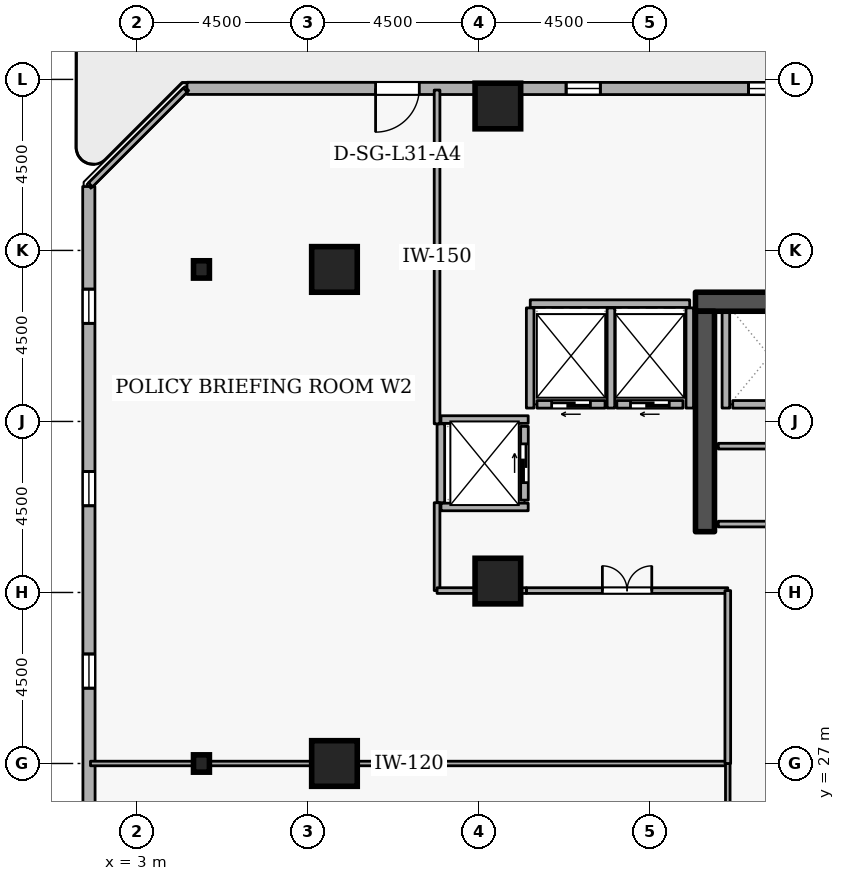
"""IFC4 building model, lengths in metres.
Left out: names, types, materials, properties, quantities, classifications, styles, units other than length and angle.
Written with IfcOpenShell. Run it as: python <this file> out.ifc"""

import sys

from ifc_helpers import new_model, si_unit, direction, frame, frame_2d, origin, origin_2d, place, context, subcontext, project, spatial, rectangle, i_section, extrude, element, fill, save


model = new_model("IFC4")
c1 = context("Model", 3, precision=1e-05, world=origin(), true_north=direction((0.0, 1.0)))
c2 = subcontext(c1, "Body", "Model", "MODEL_VIEW")
j1 = project(units=[si_unit("LENGTHUNIT", "METRE"), si_unit("PLANEANGLEUNIT", "RADIAN")], contexts=[c1])
p1 = place(None, origin())
s1 = spatial("IfcSite", under=j1, at=p1, CompositionType="ELEMENT")
p2 = place(p1, origin())
s2 = spatial("IfcBuilding", under=s1, at=p2, CompositionType="ELEMENT")
p3 = place(p2, frame((0.0, 0.0, 119.7)))
s3 = spatial("IfcBuildingStorey", under=s2, at=p3, CompositionType="ELEMENT", Elevation=119.7)
p4 = place(p3, frame((17.7, 39.15, 0.0), z_axis=(0.0, 0.0, 1.0), x_axis=(1.0, 0.0, 0.0)))
e1 = element("IfcWall", 1, at=p4, inside=s3, PredefinedType="SHEAR", context=c2, shape_type="SweptSolid", body=[
    extrude(rectangle(XDim=15.6, YDim=0.5, at=frame_2d((7.8, 0.0))), origin(), (0.0, 0.0, 1.0), 3.6),
])
p5 = place(p3, frame((17.95, 33.1, 0.0), z_axis=(0.0, 0.0, 1.0), x_axis=(0.0, 1.0, 0.0)))
e2 = element("IfcWall", 2, at=p5, inside=s3, PredefinedType="SHEAR", context=c2, shape_type="SweptSolid", body=[
    extrude(rectangle(XDim=5.8, YDim=0.5, at=frame_2d((2.9, 0.0))), origin(), (0.0, 0.0, 1.0), 3.6),
])
for number, where, z_axis, x_axis in (
    (3, (12.5, 44.3, 0.0), (0.0, 0.0, 1.0), (1.0, 0.0, 0.0)),
    (4, (8.2, 27.0, 0.0), (0.0, 0.0, 1.0), (1.0, 0.0, 0.0)),
    (5, (8.2, 40.0, 0.0), (0.0, 0.0, 1.0), (1.0, 0.0, 0.0)),
    (6, (12.5, 31.8, 0.0), (0.0, 0.0, 1.0), (1.0, 0.0, 0.0)),
):
    element("IfcColumn", number, at=place(p3, frame(where, z_axis=z_axis, x_axis=x_axis)), inside=s3, PredefinedType="COLUMN", context=c2, shape_type="SweptSolid", body=[
        extrude(rectangle(XDim=1.2, YDim=1.2, at=origin_2d()), origin(), (0.0, 0.0, 1.0), 3.6),
    ])
for number, where, z_axis, x_axis in (
    (7, (4.7, 27.0, 0.0), (0.0, 0.0, 1.0), (1.0, 0.0, 0.0)),
    (8, (4.7, 40.0, 0.0), (0.0, 0.0, 1.0), (1.0, 0.0, 0.0)),
):
    element("IfcColumn", number, at=place(p3, frame(where, z_axis=z_axis, x_axis=x_axis)), inside=s3, PredefinedType="COLUMN", context=c2, shape_type="SweptSolid", body=[
        extrude(i_section(OverallWidth=0.418, OverallDepth=0.456, WebThickness=0.042, FlangeThickness=0.067, FilletRadius=0.015, at=origin_2d()), origin(), (0.0, 0.0, 1.0), 3.6),
    ])
p6 = place(p3, frame((37.096, 44.753, 0.0), z_axis=(0.0, 0.0, 1.0), x_axis=(-0.999999933399, 0.000364968916, 0.0)))
e9 = element("IfcWall", 9, at=p6, inside=s3, PredefinedType="STANDARD", context=c2, shape_type="SweptSolid", body=[
    extrude(rectangle(XDim=32.778, YDim=0.32, at=frame_2d((16.389, 0.0))), origin(), (0.0, 0.0, 1.0), 2.7),
])
p7 = place(p6, frame((26.664, 0.0, 0.0)))
e10 = element("IfcOpeningElement", 10, at=p7, cuts=e9, PredefinedType="OPENING", context=c2, shape_type="SweptSolid", body=[
    extrude(rectangle(XDim=1.15, YDim=2.1, at=frame_2d((0.575, 1.05))), frame((0.0, 0.17, 0.0), z_axis=(0.0, -1.0, 0.0), x_axis=(1.0, 0.0, 0.0)), (0.0, 0.0, 1.0), 0.34),
])
p8 = place(p6, frame((2.7, 0.0, 0.72)))
e11 = element("IfcOpeningElement", 11, at=p8, cuts=e9, PredefinedType="OPENING", context=c2, shape_type="SweptSolid", body=[
    extrude(rectangle(XDim=0.9, YDim=1.75, at=frame_2d((0.45, 0.875))), frame((0.0, 0.17, 0.0), z_axis=(0.0, -1.0, 0.0), x_axis=(1.0, 0.0, 0.0)), (0.0, 0.0, 1.0), 0.34),
])
p9 = place(p6, frame((7.5, 0.0, 0.72)))
e12 = element("IfcOpeningElement", 12, at=p9, cuts=e9, PredefinedType="OPENING", context=c2, shape_type="SweptSolid", body=[
    extrude(rectangle(XDim=0.9, YDim=1.75, at=frame_2d((0.45, 0.875))), frame((0.0, 0.17, 0.0), z_axis=(0.0, -1.0, 0.0), x_axis=(1.0, 0.0, 0.0)), (0.0, 0.0, 1.0), 0.34),
])
p10 = place(p6, frame((17.1, 0.0, 0.72)))
e13 = element("IfcOpeningElement", 13, at=p10, cuts=e9, PredefinedType="OPENING", context=c2, shape_type="SweptSolid", body=[
    extrude(rectangle(XDim=0.9, YDim=1.75, at=frame_2d((0.45, 0.875))), frame((0.0, 0.17, 0.0), z_axis=(0.0, -1.0, 0.0), x_axis=(1.0, 0.0, 0.0)), (0.0, 0.0, 1.0), 0.34),
])
p11 = place(p6, frame((21.9, 0.0, 0.72)))
e14 = element("IfcOpeningElement", 14, at=p11, cuts=e9, PredefinedType="OPENING", context=c2, shape_type="SweptSolid", body=[
    extrude(rectangle(XDim=0.9, YDim=1.75, at=frame_2d((0.45, 0.875))), frame((0.0, 0.17, 0.0), z_axis=(0.0, -1.0, 0.0), x_axis=(1.0, 0.0, 0.0)), (0.0, 0.0, 1.0), 0.34),
])
p12 = place(p3, frame((1.735, 42.181, 0.0), z_axis=(0.0, 0.0, 1.0), x_axis=(0.000364968916, -0.999999933399, 0.0)))
e15 = element("IfcWall", 15, at=p12, inside=s3, PredefinedType="STANDARD", context=c2, shape_type="SweptSolid", body=[
    extrude(rectangle(XDim=32.778, YDim=0.32, at=frame_2d((16.389, 0.0))), origin(), (0.0, 0.0, 1.0), 2.7),
])
p13 = place(p12, frame((2.7, 0.0, 0.72)))
e16 = element("IfcOpeningElement", 16, at=p13, cuts=e15, PredefinedType="OPENING", context=c2, shape_type="SweptSolid", body=[
    extrude(rectangle(XDim=0.9, YDim=1.75, at=frame_2d((0.45, 0.875))), frame((0.0, 0.17, 0.0), z_axis=(0.0, -1.0, 0.0), x_axis=(1.0, 0.0, 0.0)), (0.0, 0.0, 1.0), 0.34),
])
p14 = place(p12, frame((7.5, 0.0, 0.72)))
e17 = element("IfcOpeningElement", 17, at=p14, cuts=e15, PredefinedType="OPENING", context=c2, shape_type="SweptSolid", body=[
    extrude(rectangle(XDim=0.9, YDim=1.75, at=frame_2d((0.45, 0.875))), frame((0.0, 0.17, 0.0), z_axis=(0.0, -1.0, 0.0), x_axis=(1.0, 0.0, 0.0)), (0.0, 0.0, 1.0), 0.34),
])
p15 = place(p12, frame((12.3, 0.0, 0.72)))
e18 = element("IfcOpeningElement", 18, at=p15, cuts=e15, PredefinedType="OPENING", context=c2, shape_type="SweptSolid", body=[
    extrude(rectangle(XDim=0.9, YDim=1.75, at=frame_2d((0.45, 0.875))), frame((0.0, 0.17, 0.0), z_axis=(0.0, -1.0, 0.0), x_axis=(1.0, 0.0, 0.0)), (0.0, 0.0, 1.0), 0.34),
])
p16 = place(p12, frame((17.1, 0.0, 0.72)))
e19 = element("IfcOpeningElement", 19, at=p16, cuts=e15, PredefinedType="OPENING", context=c2, shape_type="SweptSolid", body=[
    extrude(rectangle(XDim=0.9, YDim=1.75, at=frame_2d((0.45, 0.875))), frame((0.0, 0.17, 0.0), z_axis=(0.0, -1.0, 0.0), x_axis=(1.0, 0.0, 0.0)), (0.0, 0.0, 1.0), 0.34),
])
p17 = place(p12, frame((21.9, 0.0, 0.72)))
e20 = element("IfcOpeningElement", 20, at=p17, cuts=e15, PredefinedType="OPENING", context=c2, shape_type="SweptSolid", body=[
    extrude(rectangle(XDim=0.9, YDim=1.75, at=frame_2d((0.45, 0.875))), frame((0.0, 0.17, 0.0), z_axis=(0.0, -1.0, 0.0), x_axis=(1.0, 0.0, 0.0)), (0.0, 0.0, 1.0), 0.34),
])
p18 = place(p12, frame((26.7, 0.0, 0.72)))
e21 = element("IfcOpeningElement", 21, at=p18, cuts=e15, PredefinedType="OPENING", context=c2, shape_type="SweptSolid", body=[
    extrude(rectangle(XDim=0.9, YDim=1.75, at=frame_2d((0.45, 0.875))), frame((0.0, 0.17, 0.0), z_axis=(0.0, -1.0, 0.0), x_axis=(1.0, 0.0, 0.0)), (0.0, 0.0, 1.0), 0.34),
])
p19 = place(p3, frame((20.62, 36.45, 0.0), z_axis=(0.0, 0.0, 1.0), x_axis=(-1.0, 0.0, 0.0)))
e22 = element("IfcWall", 22, at=p19, inside=s3, PredefinedType="STANDARD", context=c2, shape_type="SweptSolid", body=[
    extrude(rectangle(XDim=1.94, YDim=0.2, at=frame_2d((0.97, 0.0))), origin(), (0.0, 0.0, 1.0), 3.32),
])
p20 = place(p3, frame((17.37, 36.45, 0.0), z_axis=(0.0, 0.0, 1.0), x_axis=(-1.0, 0.0, 0.0)))
e23 = element("IfcWall", 23, at=p20, inside=s3, PredefinedType="STANDARD", context=c2, shape_type="SweptSolid", body=[
    extrude(rectangle(XDim=1.74, YDim=0.2, at=frame_2d((0.87, 0.0))), origin(), (0.0, 0.0, 1.0), 3.32),
])
p21 = place(p20, frame((0.36, 0.0, 0.0)))
e24 = element("IfcOpeningElement", 24, at=p21, cuts=e23, PredefinedType="OPENING", context=c2, shape_type="SweptSolid", body=[
    extrude(rectangle(XDim=1.02, YDim=2.06, at=frame_2d((0.51, 1.03))), frame((0.0, 0.11, 0.0), z_axis=(0.0, -1.0, 0.0), x_axis=(1.0, 0.0, 0.0)), (0.0, 0.0, 1.0), 0.22),
])
p22 = place(p3, frame((15.32, 36.45, 0.0), z_axis=(0.0, 0.0, 1.0), x_axis=(-1.0, 0.0, 0.0)))
e25 = element("IfcWall", 25, at=p22, inside=s3, PredefinedType="STANDARD", context=c2, shape_type="SweptSolid", body=[
    extrude(rectangle(XDim=1.79, YDim=0.2, at=frame_2d((0.895, 0.0))), origin(), (0.0, 0.0, 1.0), 3.32),
])
p23 = place(p22, frame((0.385, 0.0, 0.0)))
e26 = element("IfcOpeningElement", 26, at=p23, cuts=e25, PredefinedType="OPENING", context=c2, shape_type="SweptSolid", body=[
    extrude(rectangle(XDim=1.02, YDim=2.06, at=frame_2d((0.51, 1.03))), frame((0.0, 0.11, 0.0), z_axis=(0.0, -1.0, 0.0), x_axis=(1.0, 0.0, 0.0)), (0.0, 0.0, 1.0), 0.22),
])
p24 = place(p3, frame((13.2, 33.93, 0.0), z_axis=(0.0, 0.0, 1.0), x_axis=(0.0, 1.0, 0.0)))
e27 = element("IfcWall", 27, at=p24, inside=s3, PredefinedType="STANDARD", context=c2, shape_type="SweptSolid", body=[
    extrude(rectangle(XDim=1.94, YDim=0.2, at=frame_2d((0.97, 0.0))), origin(), (0.0, 0.0, 1.0), 3.32),
])
p25 = place(p24, frame((0.46, 0.0, 0.0)))
e28 = element("IfcOpeningElement", 28, at=p25, cuts=e27, PredefinedType="OPENING", context=c2, shape_type="SweptSolid", body=[
    extrude(rectangle(XDim=1.02, YDim=2.06, at=frame_2d((0.51, 1.03))), frame((0.0, 0.11, 0.0), z_axis=(0.0, -1.0, 0.0), x_axis=(1.0, 0.0, 0.0)), (0.0, 0.0, 1.0), 0.22),
])
p26 = place(p3, frame((18.5, 36.352, 0.0), z_axis=(0.0, 0.0, 1.0), x_axis=(0.0, 1.0, 0.0)))
e29 = element("IfcWall", 29, at=p26, inside=s3, PredefinedType="STANDARD", context=c2, shape_type="SweptSolid", body=[
    extrude(rectangle(XDim=2.536, YDim=0.2, at=frame_2d((1.268, 0.0))), origin(), (0.0, 0.0, 1.0), 3.32),
])
p27 = place(p3, frame((13.352, 39.1, 0.0), z_axis=(0.0, 0.0, 1.0), x_axis=(1.0, 0.0, 0.0)))
e30 = element("IfcWall", 30, at=p27, inside=s3, PredefinedType="STANDARD", context=c2, shape_type="SweptSolid", body=[
    extrude(rectangle(XDim=4.196, YDim=0.2, at=frame_2d((2.098, 0.0))), origin(), (0.0, 0.0, 1.0), 3.32),
])
p28 = place(p3, frame((17.55, 36.352, 0.0), z_axis=(0.0, 0.0, 1.0), x_axis=(0.0, 1.0, 0.0)))
e31 = element("IfcWall", 31, at=p28, inside=s3, PredefinedType="STANDARD", context=c2, shape_type="SweptSolid", body=[
    extrude(rectangle(XDim=2.636, YDim=0.2, at=frame_2d((1.318, 0.0))), origin(), (0.0, 0.0, 1.0), 2.525),
])
for number, where, z_axis, x_axis in (
    (32, (15.475, 36.352, 0.0), (0.0, 0.0, 1.0), (0.0, 1.0, 0.0)),
    (33, (13.35, 36.352, 0.0), (0.0, 0.0, 1.0), (0.0, 1.0, 0.0)),
):
    element("IfcWall", number, at=place(p3, frame(where, z_axis=z_axis, x_axis=x_axis)), inside=s3, PredefinedType="STANDARD", context=c2, shape_type="SweptSolid", body=[
        extrude(rectangle(XDim=2.636, YDim=0.2, at=frame_2d((1.318, 0.0))), origin(), (0.0, 0.0, 1.0), 3.32),
    ])
for number, where, z_axis, x_axis in (
    (34, (11.002, 36.05, 0.0), (0.0, 0.0, 1.0), (1.0, 0.0, 0.0)),
    (35, (11.002, 33.75, 0.0), (0.0, 0.0, 1.0), (1.0, 0.0, 0.0)),
):
    element("IfcWall", number, at=place(p3, frame(where, z_axis=z_axis, x_axis=x_axis)), inside=s3, PredefinedType="STANDARD", context=c2, shape_type="SweptSolid", body=[
        extrude(rectangle(XDim=2.296, YDim=0.2, at=frame_2d((1.148, 0.0))), origin(), (0.0, 0.0, 1.0), 3.32),
    ])
p29 = place(p3, frame((11.0, 33.862, 0.0), z_axis=(0.0, 0.0, 1.0), x_axis=(0.0, 1.0, 0.0)))
e36 = element("IfcWall", 36, at=p29, inside=s3, PredefinedType="STANDARD", context=c2, shape_type="SweptSolid", body=[
    extrude(rectangle(XDim=2.076, YDim=0.2, at=frame_2d((1.038, 0.0))), origin(), (0.0, 0.0, 1.0), 3.32),
])
p30 = place(p3, frame((18.3, 35.35, 0.0), z_axis=(0.0, 0.0, 1.0), x_axis=(1.0, 0.0, 0.0)))
e37 = element("IfcWall", 37, at=p30, inside=s3, PredefinedType="PARTITIONING", context=c2, shape_type="SweptSolid", body=[
    extrude(rectangle(XDim=4.25, YDim=0.15, at=frame_2d((2.125, 0.0))), origin(), (0.0, 0.0, 1.0), 3.32),
])
p31 = place(p3, frame((22.55, 33.3, 0.0), z_axis=(0.0, 0.0, 1.0), x_axis=(-1.0, 0.0, 0.0)))
e38 = element("IfcWall", 38, at=p31, inside=s3, PredefinedType="PARTITIONING", context=c2, shape_type="SweptSolid", body=[
    extrude(rectangle(XDim=4.25, YDim=0.15, at=frame_2d((2.125, 0.0))), origin(), (0.0, 0.0, 1.0), 3.32),
])
p32 = place(p31, frame((1.665, 0.0, 0.0)))
e39 = element("IfcOpeningElement", 39, at=p32, cuts=e38, PredefinedType="OPENING", context=c2, shape_type="SweptSolid", body=[
    extrude(rectangle(XDim=0.92, YDim=2.08, at=frame_2d((0.46, 1.04))), frame((0.0, 0.085, 0.0), z_axis=(0.0, -1.0, 0.0), x_axis=(1.0, 0.0, 0.0)), (0.0, 0.0, 1.0), 0.17),
])
p33 = place(p3, frame((1.78, 27.0, 0.0), z_axis=(0.0, 0.0, 1.0), x_axis=(1.0, 0.0, 0.0)))
e40 = element("IfcWall", 40, at=p33, inside=s3, PredefinedType="PARTITIONING", context=c2, shape_type="SweptSolid", body=[
    extrude(rectangle(XDim=16.77, YDim=0.12, at=frame_2d((8.385, 0.0))), origin(), (0.0, 0.0, 1.0), 2.912),
])
p34 = place(p3, frame((18.55, 27.0, 0.0), z_axis=(0.0, 0.0, 1.0), x_axis=(0.0, -1.0, 0.0)))
e41 = element("IfcWall", 41, at=p34, inside=s3, PredefinedType="PARTITIONING", context=c2, shape_type="SweptSolid", body=[
    extrude(rectangle(XDim=4.55, YDim=0.12, at=frame_2d((2.275, 0.0))), origin(), (0.0, 0.0, 1.0), 3.32),
])
p35 = place(p3, frame((13.25, 31.55, 0.0), z_axis=(0.0, 0.0, 1.0), x_axis=(1.0, 0.0, 0.0)))
e42 = element("IfcWall", 42, at=p35, inside=s3, PredefinedType="PARTITIONING", context=c2, shape_type="SweptSolid", body=[
    extrude(rectangle(XDim=5.3, YDim=0.15, at=frame_2d((2.65, 0.0))), origin(), (0.0, 0.0, 1.0), 3.32),
])
p36 = place(p35, frame((2.0, 0.0, 0.0)))
e43 = element("IfcOpeningElement", 43, at=p36, cuts=e42, PredefinedType="OPENING", context=c2, shape_type="SweptSolid", body=[
    extrude(rectangle(XDim=1.3, YDim=2.12, at=frame_2d((0.65, 1.06))), frame((0.0, 0.085, 0.0), z_axis=(0.0, -1.0, 0.0), x_axis=(1.0, 0.0, 0.0)), (0.0, 0.0, 1.0), 0.17),
])
p37 = place(p3, frame((18.55, 31.55, 0.0), z_axis=(0.0, 0.0, 1.0), x_axis=(0.0, -1.0, 0.0)))
e44 = element("IfcWall", 44, at=p37, inside=s3, PredefinedType="PARTITIONING", context=c2, shape_type="SweptSolid", body=[
    extrude(rectangle(XDim=4.55, YDim=0.15, at=frame_2d((2.275, 0.0))), origin(), (0.0, 0.0, 1.0), 3.32),
])
p38 = place(p3, frame((1.78, 42.225, 0.0), z_axis=(0.0, 0.0, 1.0), x_axis=(0.707106781187, 0.707106781187, 0.0)))
e45 = element("IfcWall", 45, at=p38, inside=s3, PredefinedType="PARTITIONING", context=c2, shape_type="SweptSolid", body=[
    extrude(rectangle(XDim=3.528, YDim=0.15, at=frame_2d((1.764, 0.0))), origin(), (0.0, 0.0, 1.0), 3.32),
])
p39 = place(p3, frame((10.9, 44.72, 0.0), z_axis=(0.0, 0.0, 1.0), x_axis=(0.0, -1.0, 0.0)))
e46 = element("IfcWall", 46, at=p39, inside=s3, PredefinedType="PARTITIONING", context=c2, shape_type="SweptSolid", body=[
    extrude(rectangle(XDim=8.782, YDim=0.15, at=frame_2d((4.391, 0.0))), origin(), (0.0, 0.0, 1.0), 3.32),
])
p40 = place(p3, frame((10.9, 33.862, 0.0), z_axis=(0.0, 0.0, 1.0), x_axis=(0.0, -1.0, 0.0)))
e47 = element("IfcWall", 47, at=p40, inside=s3, PredefinedType="PARTITIONING", context=c2, shape_type="SweptSolid", body=[
    extrude(rectangle(XDim=2.312, YDim=0.15, at=frame_2d((1.156, 0.0))), origin(), (0.0, 0.0, 1.0), 3.32),
])
p41 = place(p3, frame((10.9, 31.55, 0.0), z_axis=(0.0, 0.0, 1.0), x_axis=(1.0, 0.0, 0.0)))
e48 = element("IfcWall", 48, at=p41, inside=s3, PredefinedType="PARTITIONING", context=c2, shape_type="SweptSolid", body=[
    extrude(rectangle(XDim=2.35, YDim=0.15, at=frame_2d((1.175, 0.0))), origin(), (0.0, 0.0, 1.0), 3.32),
])
p42 = place(p7, origin())
e49 = element("IfcDoor", 49, at=p42, inside=s3, OperationType="SINGLE_SWING_RIGHT", PredefinedType="DOOR", context=c2, shape_type="SweptSolid", body=[
    extrude(rectangle(XDim=1.15, YDim=2.1, at=frame_2d((0.575, 1.05))), frame((0.0, 0.025, 0.0), z_axis=(0.0, -1.0, 0.0), x_axis=(1.0, 0.0, 0.0)), (0.0, 0.0, 1.0), 0.05),
])
fill(e10, e49)
p43 = place(p10, origin())
e50 = element("IfcWindow", 50, at=p43, inside=s3, PartitioningType="SINGLE_PANEL", PredefinedType="WINDOW", context=c2, shape_type="SweptSolid", body=[
    extrude(rectangle(XDim=0.9, YDim=1.75, at=frame_2d((0.45, 0.875))), frame((0.0, 0.03, 0.0), z_axis=(0.0, -1.0, 0.0), x_axis=(1.0, 0.0, 0.0)), (0.0, 0.0, 1.0), 0.06),
])
fill(e13, e50)
p44 = place(p11, origin())
e51 = element("IfcWindow", 51, at=p44, inside=s3, PartitioningType="SINGLE_PANEL", PredefinedType="WINDOW", context=c2, shape_type="SweptSolid", body=[
    extrude(rectangle(XDim=0.9, YDim=1.75, at=frame_2d((0.45, 0.875))), frame((0.0, 0.03, 0.0), z_axis=(0.0, -1.0, 0.0), x_axis=(1.0, 0.0, 0.0)), (0.0, 0.0, 1.0), 0.06),
])
fill(e14, e51)
p45 = place(p13, origin())
e52 = element("IfcWindow", 52, at=p45, inside=s3, PartitioningType="SINGLE_PANEL", PredefinedType="WINDOW", context=c2, shape_type="SweptSolid", body=[
    extrude(rectangle(XDim=0.9, YDim=1.75, at=frame_2d((0.45, 0.875))), frame((0.0, 0.03, 0.0), z_axis=(0.0, -1.0, 0.0), x_axis=(1.0, 0.0, 0.0)), (0.0, 0.0, 1.0), 0.06),
])
fill(e16, e52)
p46 = place(p14, origin())
e53 = element("IfcWindow", 53, at=p46, inside=s3, PartitioningType="SINGLE_PANEL", PredefinedType="WINDOW", context=c2, shape_type="SweptSolid", body=[
    extrude(rectangle(XDim=0.9, YDim=1.75, at=frame_2d((0.45, 0.875))), frame((0.0, 0.03, 0.0), z_axis=(0.0, -1.0, 0.0), x_axis=(1.0, 0.0, 0.0)), (0.0, 0.0, 1.0), 0.06),
])
fill(e17, e53)
p47 = place(p15, origin())
e54 = element("IfcWindow", 54, at=p47, inside=s3, PartitioningType="SINGLE_PANEL", PredefinedType="WINDOW", context=c2, shape_type="SweptSolid", body=[
    extrude(rectangle(XDim=0.9, YDim=1.75, at=frame_2d((0.45, 0.875))), frame((0.0, 0.03, 0.0), z_axis=(0.0, -1.0, 0.0), x_axis=(1.0, 0.0, 0.0)), (0.0, 0.0, 1.0), 0.06),
])
fill(e18, e54)
p48 = place(p21, origin())
e55 = element("IfcDoor", 55, at=p48, inside=s3, OperationType="SLIDING_TO_LEFT", PredefinedType="DOOR", context=c2, shape_type="SweptSolid", body=[
    extrude(rectangle(XDim=1.02, YDim=2.06, at=frame_2d((0.51, 1.03))), frame((0.0, 0.025, 0.0), z_axis=(0.0, -1.0, 0.0), x_axis=(1.0, 0.0, 0.0)), (0.0, 0.0, 1.0), 0.05),
])
fill(e24, e55)
p49 = place(p23, origin())
e56 = element("IfcDoor", 56, at=p49, inside=s3, OperationType="SLIDING_TO_LEFT", PredefinedType="DOOR", context=c2, shape_type="SweptSolid", body=[
    extrude(rectangle(XDim=1.02, YDim=2.06, at=frame_2d((0.51, 1.03))), frame((0.0, 0.025, 0.0), z_axis=(0.0, -1.0, 0.0), x_axis=(1.0, 0.0, 0.0)), (0.0, 0.0, 1.0), 0.05),
])
fill(e26, e56)
p50 = place(p25, origin())
e57 = element("IfcDoor", 57, at=p50, inside=s3, OperationType="SLIDING_TO_LEFT", PredefinedType="DOOR", context=c2, shape_type="SweptSolid", body=[
    extrude(rectangle(XDim=1.02, YDim=2.06, at=frame_2d((0.51, 1.03))), frame((0.0, 0.025, 0.0), z_axis=(0.0, -1.0, 0.0), x_axis=(1.0, 0.0, 0.0)), (0.0, 0.0, 1.0), 0.05),
])
fill(e28, e57)
p51 = place(p36, origin())
e58 = element("IfcDoor", 58, at=p51, inside=s3, OperationType="DOUBLE_DOOR_SINGLE_SWING", PredefinedType="DOOR", context=c2, shape_type="SweptSolid", body=[
    extrude(rectangle(XDim=1.3, YDim=2.12, at=frame_2d((0.65, 1.06))), frame((0.0, 0.025, 0.0), z_axis=(0.0, -1.0, 0.0), x_axis=(1.0, 0.0, 0.0)), (0.0, 0.0, 1.0), 0.05),
])
fill(e43, e58)
save(model, sys.argv[1])
